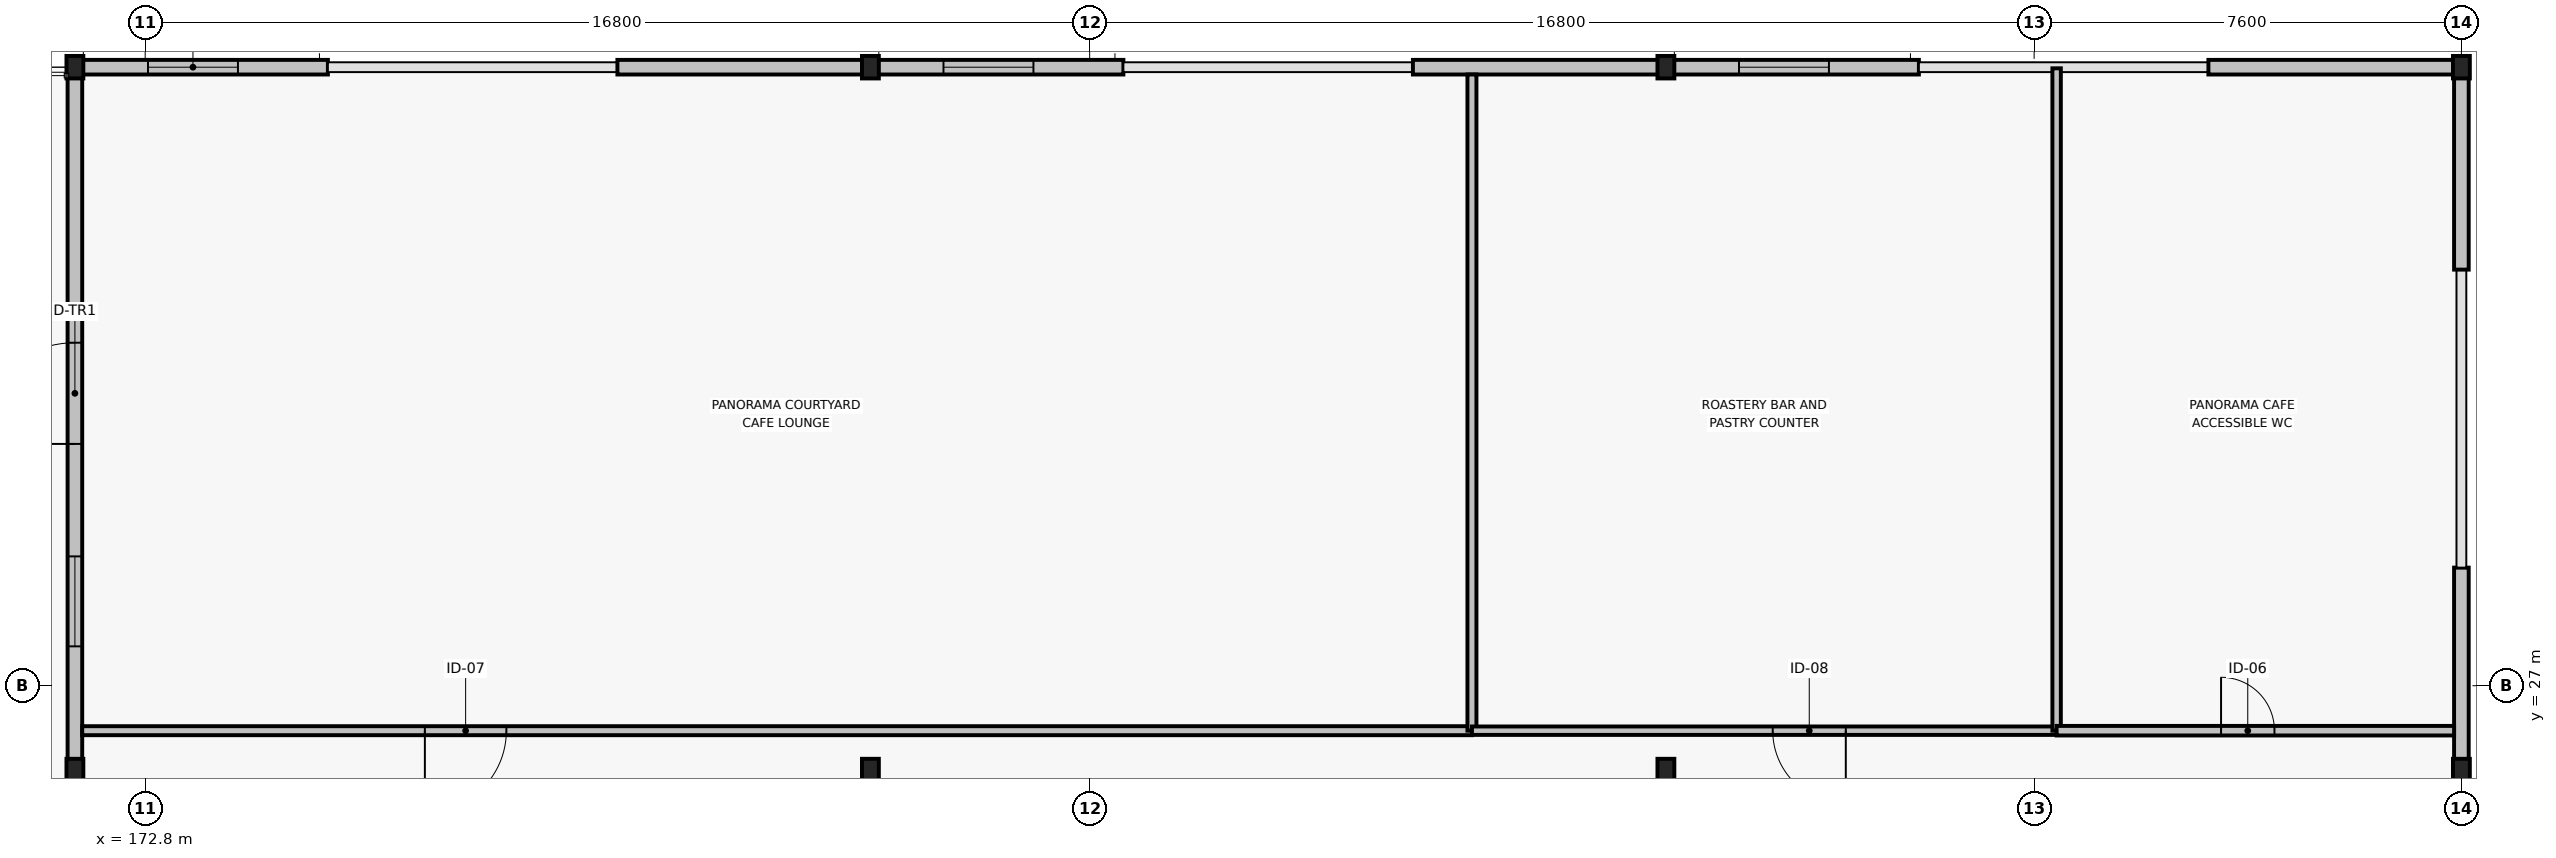
"""IFC4 building model, lengths in metres.
Left out: names, types, materials, properties, quantities, classifications, styles, units other than length and angle.
Written with IfcOpenShell. Run it as: python <this file> out.ifc"""

import sys

from ifc_helpers import new_model, si_unit, direction, frame, frame_2d, origin, origin_2d, place, context, subcontext, project, spatial, polyline, rectangle, i_section, outline, extrude, element, fill, save


model = new_model("IFC4")
c1 = context("Model", 3, precision=1e-05, world=origin(), true_north=direction((0.0, 1.0)))
c2 = subcontext(c1, "Body", "Model", "MODEL_VIEW")
j1 = project(units=[si_unit("LENGTHUNIT", "METRE"), si_unit("PLANEANGLEUNIT", "RADIAN")], contexts=[c1])
p1 = place(None, origin())
s1 = spatial("IfcSite", under=j1, at=p1, CompositionType="ELEMENT")
p2 = place(p1, origin())
s2 = spatial("IfcBuilding", under=s1, at=p2, CompositionType="ELEMENT")
p3 = place(p2, frame((0.0, 0.0, 10.8)))
s3 = spatial("IfcBuildingStorey", under=s2, at=p3, CompositionType="ELEMENT", Elevation=10.8)
p4 = place(p3, frame((171.55, 25.5, 0.0), z_axis=(0.0, 0.0, 1.0), x_axis=(1.0, 0.0, 0.0)))
e1 = element("IfcColumn", 1, at=p4, inside=s3, PredefinedType="COLUMN", context=c2, shape_type="SweptSolid", body=[
    extrude(i_section(OverallWidth=0.3, OverallDepth=0.4, WebThickness=0.013, FlangeThickness=0.024, FilletRadius=0.027, at=origin_2d()), origin(), (0.0, 0.0, 1.0), 4.915),
])
p5 = place(p3, frame((171.55, 38.0, 0.0), z_axis=(0.0, 0.0, 1.0), x_axis=(1.0, 0.0, 0.0)))
e2 = element("IfcColumn", 2, at=p5, inside=s3, PredefinedType="COLUMN", context=c2, shape_type="SweptSolid", body=[
    extrude(i_section(OverallWidth=0.3, OverallDepth=0.4, WebThickness=0.013, FlangeThickness=0.024, FilletRadius=0.027, at=origin_2d()), origin(), (0.0, 0.0, 1.0), 7.24),
])
p6 = place(p3, frame((185.7, 25.5, 0.0), z_axis=(0.0, 0.0, 1.0), x_axis=(1.0, 0.0, 0.0)))
e3 = element("IfcColumn", 3, at=p6, inside=s3, PredefinedType="COLUMN", context=c2, shape_type="SweptSolid", body=[
    extrude(i_section(OverallWidth=0.3, OverallDepth=0.4, WebThickness=0.013, FlangeThickness=0.024, FilletRadius=0.027, at=origin_2d()), origin(), (0.0, 0.0, 1.0), 4.915),
])
p7 = place(p3, frame((185.7, 38.0, 0.0), z_axis=(0.0, 0.0, 1.0), x_axis=(1.0, 0.0, 0.0)))
e4 = element("IfcColumn", 4, at=p7, inside=s3, PredefinedType="COLUMN", context=c2, shape_type="SweptSolid", body=[
    extrude(i_section(OverallWidth=0.3, OverallDepth=0.4, WebThickness=0.013, FlangeThickness=0.024, FilletRadius=0.027, at=origin_2d()), origin(), (0.0, 0.0, 1.0), 7.24),
])
p8 = place(p3, frame((199.85, 25.5, 0.0), z_axis=(0.0, 0.0, 1.0), x_axis=(1.0, 0.0, 0.0)))
e5 = element("IfcColumn", 5, at=p8, inside=s3, PredefinedType="COLUMN", context=c2, shape_type="SweptSolid", body=[
    extrude(i_section(OverallWidth=0.3, OverallDepth=0.4, WebThickness=0.013, FlangeThickness=0.024, FilletRadius=0.027, at=origin_2d()), origin(), (0.0, 0.0, 1.0), 4.915),
])
p9 = place(p3, frame((199.85, 38.0, 0.0), z_axis=(0.0, 0.0, 1.0), x_axis=(1.0, 0.0, 0.0)))
e6 = element("IfcColumn", 6, at=p9, inside=s3, PredefinedType="COLUMN", context=c2, shape_type="SweptSolid", body=[
    extrude(i_section(OverallWidth=0.3, OverallDepth=0.4, WebThickness=0.013, FlangeThickness=0.024, FilletRadius=0.027, at=origin_2d()), origin(), (0.0, 0.0, 1.0), 7.24),
])
p10 = place(p3, frame((214.0, 25.5, 0.0), z_axis=(0.0, 0.0, 1.0), x_axis=(1.0, 0.0, 0.0)))
e7 = element("IfcColumn", 7, at=p10, inside=s3, PredefinedType="COLUMN", context=c2, shape_type="SweptSolid", body=[
    extrude(i_section(OverallWidth=0.3, OverallDepth=0.4, WebThickness=0.013, FlangeThickness=0.024, FilletRadius=0.027, at=origin_2d()), origin(), (0.0, 0.0, 1.0), 4.915),
])
p11 = place(p3, frame((214.0, 38.0, 0.0), z_axis=(0.0, 0.0, 1.0), x_axis=(1.0, 0.0, 0.0)))
e8 = element("IfcColumn", 8, at=p11, inside=s3, PredefinedType="COLUMN", context=c2, shape_type="SweptSolid", body=[
    extrude(i_section(OverallWidth=0.3, OverallDepth=0.4, WebThickness=0.013, FlangeThickness=0.024, FilletRadius=0.027, at=origin_2d()), origin(), (0.0, 0.0, 1.0), 7.24),
])
p12 = place(p3, frame((171.55, 38.0, 0.0), z_axis=(0.0, 0.0, 1.0), x_axis=(1.0, 0.0, 0.0)))
e9 = element("IfcWall", 9, at=p12, inside=s3, PredefinedType="STANDARD", context=c2, shape_type="SweptSolid", body=[
    extrude(rectangle(XDim=4.5, YDim=0.26, at=frame_2d((2.25, 0.0))), origin(), (0.0, 0.0, 1.0), 6.945),
])
p13 = place(p12, frame((1.3, 0.0, 0.7)))
e10 = element("IfcOpeningElement", 10, at=p13, cuts=e9, PredefinedType="OPENING", context=c2, shape_type="SweptSolid", body=[
    extrude(rectangle(XDim=1.6, YDim=1.5, at=frame_2d((0.8, 0.75))), frame((0.0, 0.14, 0.0), z_axis=(0.0, -1.0, 0.0), x_axis=(1.0, 0.0, 0.0)), (0.0, 0.0, 1.0), 0.28),
])
p14 = place(p3, frame((181.2, 38.0, 0.0), z_axis=(0.0, 0.0, 1.0), x_axis=(1.0, 0.0, 0.0)))
e11 = element("IfcWall", 11, at=p14, inside=s3, PredefinedType="STANDARD", context=c2, shape_type="SweptSolid", body=[
    extrude(rectangle(XDim=4.5, YDim=0.26, at=frame_2d((2.25, 0.0))), origin(), (0.0, 0.0, 1.0), 6.945),
])
p15 = place(p3, frame((185.7, 38.0, 0.0), z_axis=(0.0, 0.0, 1.0), x_axis=(1.0, 0.0, 0.0)))
e12 = element("IfcWall", 12, at=p15, inside=s3, PredefinedType="STANDARD", context=c2, shape_type="SweptSolid", body=[
    extrude(rectangle(XDim=4.5, YDim=0.26, at=frame_2d((2.25, 0.0))), origin(), (0.0, 0.0, 1.0), 6.945),
])
p16 = place(p15, frame((1.3, 0.0, 0.7)))
e13 = element("IfcOpeningElement", 13, at=p16, cuts=e12, PredefinedType="OPENING", context=c2, shape_type="SweptSolid", body=[
    extrude(rectangle(XDim=1.6, YDim=1.5, at=frame_2d((0.8, 0.75))), frame((0.0, 0.14, 0.0), z_axis=(0.0, -1.0, 0.0), x_axis=(1.0, 0.0, 0.0)), (0.0, 0.0, 1.0), 0.28),
])
p17 = place(p3, frame((195.35, 38.0, 0.0), z_axis=(0.0, 0.0, 1.0), x_axis=(1.0, 0.0, 0.0)))
e14 = element("IfcWall", 14, at=p17, inside=s3, PredefinedType="STANDARD", context=c2, shape_type="SweptSolid", body=[
    extrude(rectangle(XDim=4.5, YDim=0.26, at=frame_2d((2.25, 0.0))), origin(), (0.0, 0.0, 1.0), 6.945),
])
p18 = place(p3, frame((199.85, 38.0, 0.0), z_axis=(0.0, 0.0, 1.0), x_axis=(1.0, 0.0, 0.0)))
e15 = element("IfcWall", 15, at=p18, inside=s3, PredefinedType="STANDARD", context=c2, shape_type="SweptSolid", body=[
    extrude(rectangle(XDim=4.5, YDim=0.26, at=frame_2d((2.25, 0.0))), origin(), (0.0, 0.0, 1.0), 6.945),
])
p19 = place(p18, frame((1.3, 0.0, 0.7)))
e16 = element("IfcOpeningElement", 16, at=p19, cuts=e15, PredefinedType="OPENING", context=c2, shape_type="SweptSolid", body=[
    extrude(rectangle(XDim=1.6, YDim=1.5, at=frame_2d((0.8, 0.75))), frame((0.0, 0.14, 0.0), z_axis=(0.0, -1.0, 0.0), x_axis=(1.0, 0.0, 0.0)), (0.0, 0.0, 1.0), 0.28),
])
p20 = place(p3, frame((209.5, 38.0, 0.0), z_axis=(0.0, 0.0, 1.0), x_axis=(1.0, 0.0, 0.0)))
e17 = element("IfcWall", 17, at=p20, inside=s3, PredefinedType="STANDARD", context=c2, shape_type="SweptSolid", body=[
    extrude(rectangle(XDim=4.5, YDim=0.26, at=frame_2d((2.25, 0.0))), origin(), (0.0, 0.0, 1.0), 6.945),
])
p21 = place(p3, frame((171.55, 21.9, 0.0), z_axis=(0.0, 0.0, 1.0), x_axis=(0.0, 1.0, 0.0)))
e18 = element("IfcWall", 18, at=p21, inside=s3, PredefinedType="STANDARD", context=c2, shape_type="SweptSolid", body=[
    extrude(outline(polyline([(0.0, 0.0), (3.6, 0.0), (3.6, 4.723), (0.0, 4.053), (0.0, 0.0)])), frame((0.0, 0.13, 0.0), z_axis=(0.0, -1.0, 0.0), x_axis=(1.0, 0.0, 0.0)), (0.0, 0.0, 1.0), 0.26),
])
p22 = place(p3, frame((171.55, 25.5, 0.0), z_axis=(0.0, 0.0, 1.0), x_axis=(0.0, 1.0, 0.0)))
e19 = element("IfcWall", 19, at=p22, inside=s3, PredefinedType="STANDARD", context=c2, shape_type="SweptSolid", body=[
    extrude(outline(polyline([(0.0, 0.0), (12.37, 0.0), (12.37, 6.945), (0.0, 4.723), (0.0, 0.0)])), frame((0.0, 0.13, 0.0), z_axis=(0.0, -1.0, 0.0), x_axis=(1.0, 0.0, 0.0)), (0.0, 0.0, 1.0), 0.26),
])
p23 = place(p22, frame((5.8, 0.0, 0.0)))
e20 = element("IfcOpeningElement", 20, at=p23, cuts=e19, PredefinedType="OPENING", context=c2, shape_type="SweptSolid", body=[
    extrude(rectangle(XDim=1.8, YDim=2.35, at=frame_2d((0.9, 1.175))), frame((0.0, 0.14, 0.0), z_axis=(0.0, -1.0, 0.0), x_axis=(1.0, 0.0, 0.0)), (0.0, 0.0, 1.0), 0.28),
])
p24 = place(p22, frame((2.2, 0.0, 0.7)))
e21 = element("IfcOpeningElement", 21, at=p24, cuts=e19, PredefinedType="OPENING", context=c2, shape_type="SweptSolid", body=[
    extrude(rectangle(XDim=1.6, YDim=1.5, at=frame_2d((0.8, 0.75))), frame((0.0, 0.14, 0.0), z_axis=(0.0, -1.0, 0.0), x_axis=(1.0, 0.0, 0.0)), (0.0, 0.0, 1.0), 0.28),
])
p25 = place(p3, frame((214.0, 21.9, 0.0), z_axis=(0.0, 0.0, 1.0), x_axis=(0.0, 1.0, 0.0)))
e22 = element("IfcWall", 22, at=p25, inside=s3, PredefinedType="STANDARD", context=c2, shape_type="SweptSolid", body=[
    extrude(outline(polyline([(0.0, 0.0), (3.6, 0.0), (3.6, 4.723), (0.0, 4.053), (0.0, 0.0)])), frame((0.0, 0.13, 0.0), z_axis=(0.0, -1.0, 0.0), x_axis=(1.0, 0.0, 0.0)), (0.0, 0.0, 1.0), 0.26),
])
p26 = place(p3, frame((214.0, 25.5, 0.0), z_axis=(0.0, 0.0, 1.0), x_axis=(0.0, 1.0, 0.0)))
e23 = element("IfcWall", 23, at=p26, inside=s3, PredefinedType="STANDARD", context=c2, shape_type="SweptSolid", body=[
    extrude(outline(polyline([(0.0, 0.0), (3.6, 0.0), (3.6, 5.392), (0.0, 4.723), (0.0, 0.0)])), frame((0.0, 0.13, 0.0), z_axis=(0.0, -1.0, 0.0), x_axis=(1.0, 0.0, 0.0)), (0.0, 0.0, 1.0), 0.26),
])
p27 = place(p3, frame((214.0, 34.4, 0.0), z_axis=(0.0, 0.0, 1.0), x_axis=(0.0, 1.0, 0.0)))
e24 = element("IfcWall", 24, at=p27, inside=s3, PredefinedType="STANDARD", context=c2, shape_type="SweptSolid", body=[
    extrude(outline(polyline([(0.0, 0.0), (3.47, 0.0), (3.47, 6.945), (0.0, 6.378), (0.0, 0.0)])), frame((0.0, 0.13, 0.0), z_axis=(0.0, -1.0, 0.0), x_axis=(1.0, 0.0, 0.0)), (0.0, 0.0, 1.0), 0.26),
])
p28 = place(p3, frame((171.68, 26.2, 0.0), z_axis=(0.0, 0.0, 1.0), x_axis=(1.0, 0.0, 0.0)))
e25 = element("IfcWall", 25, at=p28, inside=s3, PredefinedType="PARTITIONING", context=c2, shape_type="SweptSolid", body=[
    extrude(rectangle(XDim=24.72, YDim=0.16, at=frame_2d((12.36, 0.0))), origin(), (0.0, 0.0, 1.0), 4.62),
])
p29 = place(p28, frame((7.545, 0.0, 0.0), z_axis=(0.0, 0.0, 1.0), x_axis=(-1.0, 0.0, 0.0)))
e26 = element("IfcOpeningElement", 26, at=p29, cuts=e25, PredefinedType="OPENING", context=c2, shape_type="SweptSolid", body=[
    extrude(rectangle(XDim=1.45, YDim=2.25, at=frame_2d((0.725, 1.125))), frame((0.0, 0.09, 0.0), z_axis=(0.0, -1.0, 0.0), x_axis=(1.0, 0.0, 0.0)), (0.0, 0.0, 1.0), 0.18),
])
p30 = place(p3, frame((196.4, 26.2, 0.0), z_axis=(0.0, 0.0, 1.0), x_axis=(0.0, 1.0, 0.0)))
e27 = element("IfcWall", 27, at=p30, inside=s3, PredefinedType="PARTITIONING", context=c2, shape_type="SweptSolid", body=[
    extrude(outline(polyline([(0.0, 0.0), (11.67, 0.0), (11.67, 6.94), (0.0, 4.848), (0.0, 0.0)])), frame((0.0, 0.08, 0.0), z_axis=(0.0, -1.0, 0.0), x_axis=(1.0, 0.0, 0.0)), (0.0, 0.0, 1.0), 0.16),
])
p31 = place(p3, frame((196.4, 26.2, 0.0), z_axis=(0.0, 0.0, 1.0), x_axis=(1.0, 0.0, 0.0)))
e28 = element("IfcWall", 28, at=p31, inside=s3, PredefinedType="PARTITIONING", context=c2, shape_type="SweptSolid", body=[
    extrude(rectangle(XDim=10.4, YDim=0.15, at=frame_2d((5.2, 0.0))), origin(), (0.0, 0.0, 1.0), 4.62),
])
p32 = place(p31, frame((5.35, 0.0, 0.0)))
e29 = element("IfcOpeningElement", 29, at=p32, cuts=e28, PredefinedType="OPENING", context=c2, shape_type="SweptSolid", body=[
    extrude(rectangle(XDim=1.3, YDim=2.15, at=frame_2d((0.65, 1.075))), frame((0.0, 0.085, 0.0), z_axis=(0.0, -1.0, 0.0), x_axis=(1.0, 0.0, 0.0)), (0.0, 0.0, 1.0), 0.17),
])
p33 = place(p3, frame((206.8, 26.2, 0.0), z_axis=(0.0, 0.0, 1.0), x_axis=(0.0, 1.0, 0.0)))
e30 = element("IfcWall", 30, at=p33, inside=s3, PredefinedType="PARTITIONING", context=c2, shape_type="SweptSolid", body=[
    extrude(outline(polyline([(0.0, 0.0), (11.78, 0.0), (11.78, 6.94), (0.0, 4.848), (0.0, 0.0)])), frame((0.0, 0.075, 0.0), z_axis=(0.0, -1.0, 0.0), x_axis=(1.0, 0.0, 0.0)), (0.0, 0.0, 1.0), 0.15),
])
p34 = place(p3, frame((206.8, 26.2, 0.0), z_axis=(0.0, 0.0, 1.0), x_axis=(1.0, 0.0, 0.0)))
e31 = element("IfcWall", 31, at=p34, inside=s3, PredefinedType="PLUMBINGWALL", context=c2, shape_type="SweptSolid", body=[
    extrude(rectangle(XDim=7.07, YDim=0.17, at=frame_2d((3.535, 0.0))), origin(), (0.0, 0.0, 1.0), 4.62),
])
p35 = place(p34, frame((2.925, 0.0, 0.0)))
e32 = element("IfcOpeningElement", 32, at=p35, cuts=e31, PredefinedType="OPENING", context=c2, shape_type="SweptSolid", body=[
    extrude(rectangle(XDim=0.95, YDim=2.15, at=frame_2d((0.475, 1.075))), frame((0.0, 0.095, 0.0), z_axis=(0.0, -1.0, 0.0), x_axis=(1.0, 0.0, 0.0)), (0.0, 0.0, 1.0), 0.19),
])
p36 = place(p13, origin())
e33 = element("IfcWindow", 33, at=p36, inside=s3, PartitioningType="SINGLE_PANEL", PredefinedType="WINDOW", context=c2, shape_type="SweptSolid", body=[
    extrude(rectangle(XDim=1.6, YDim=1.5, at=frame_2d((0.8, 0.75))), frame((0.0, 0.03, 0.0), z_axis=(0.0, -1.0, 0.0), x_axis=(1.0, 0.0, 0.0)), (0.0, 0.0, 1.0), 0.06),
])
fill(e10, e33)
p37 = place(p16, origin())
e34 = element("IfcWindow", 34, at=p37, inside=s3, PartitioningType="SINGLE_PANEL", PredefinedType="WINDOW", context=c2, shape_type="SweptSolid", body=[
    extrude(rectangle(XDim=1.6, YDim=1.5, at=frame_2d((0.8, 0.75))), frame((0.0, 0.03, 0.0), z_axis=(0.0, -1.0, 0.0), x_axis=(1.0, 0.0, 0.0)), (0.0, 0.0, 1.0), 0.06),
])
fill(e13, e34)
p38 = place(p19, origin())
e35 = element("IfcWindow", 35, at=p38, inside=s3, PartitioningType="SINGLE_PANEL", PredefinedType="WINDOW", context=c2, shape_type="SweptSolid", body=[
    extrude(rectangle(XDim=1.6, YDim=1.5, at=frame_2d((0.8, 0.75))), frame((0.0, 0.03, 0.0), z_axis=(0.0, -1.0, 0.0), x_axis=(1.0, 0.0, 0.0)), (0.0, 0.0, 1.0), 0.06),
])
fill(e16, e35)
p39 = place(p23, origin())
e36 = element("IfcDoor", 36, at=p39, inside=s3, OperationType="SINGLE_SWING_LEFT", PredefinedType="DOOR", context=c2, shape_type="SweptSolid", body=[
    extrude(rectangle(XDim=1.8, YDim=2.35, at=frame_2d((0.9, 1.175))), frame((0.0, 0.025, 0.0), z_axis=(0.0, -1.0, 0.0), x_axis=(1.0, 0.0, 0.0)), (0.0, 0.0, 1.0), 0.05),
])
fill(e20, e36)
p40 = place(p24, origin())
e37 = element("IfcWindow", 37, at=p40, inside=s3, PartitioningType="SINGLE_PANEL", PredefinedType="WINDOW", context=c2, shape_type="SweptSolid", body=[
    extrude(rectangle(XDim=1.6, YDim=1.5, at=frame_2d((0.8, 0.75))), frame((0.0, 0.03, 0.0), z_axis=(0.0, -1.0, 0.0), x_axis=(1.0, 0.0, 0.0)), (0.0, 0.0, 1.0), 0.06),
])
fill(e21, e37)
p41 = place(p29, origin())
e38 = element("IfcDoor", 38, at=p41, inside=s3, OperationType="SINGLE_SWING_LEFT", PredefinedType="DOOR", context=c2, shape_type="SweptSolid", body=[
    extrude(rectangle(XDim=1.45, YDim=2.25, at=frame_2d((0.725, 1.125))), frame((0.0, 0.025, 0.0), z_axis=(0.0, -1.0, 0.0), x_axis=(1.0, 0.0, 0.0)), (0.0, 0.0, 1.0), 0.05),
])
fill(e26, e38)
p42 = place(p32, origin())
e39 = element("IfcDoor", 39, at=p42, inside=s3, OperationType="SINGLE_SWING_RIGHT", PredefinedType="DOOR", context=c2, shape_type="SweptSolid", body=[
    extrude(rectangle(XDim=1.3, YDim=2.15, at=frame_2d((0.65, 1.075))), frame((0.0, 0.025, 0.0), z_axis=(0.0, -1.0, 0.0), x_axis=(1.0, 0.0, 0.0)), (0.0, 0.0, 1.0), 0.05),
])
fill(e29, e39)
p43 = place(p35, origin())
e40 = element("IfcDoor", 40, at=p43, inside=s3, OperationType="SINGLE_SWING_LEFT", PredefinedType="DOOR", context=c2, shape_type="SweptSolid", body=[
    extrude(rectangle(XDim=0.95, YDim=2.15, at=frame_2d((0.475, 1.075))), frame((0.0, 0.025, 0.0), z_axis=(0.0, -1.0, 0.0), x_axis=(1.0, 0.0, 0.0)), (0.0, 0.0, 1.0), 0.05),
])
fill(e32, e40)
save(model, sys.argv[1])
